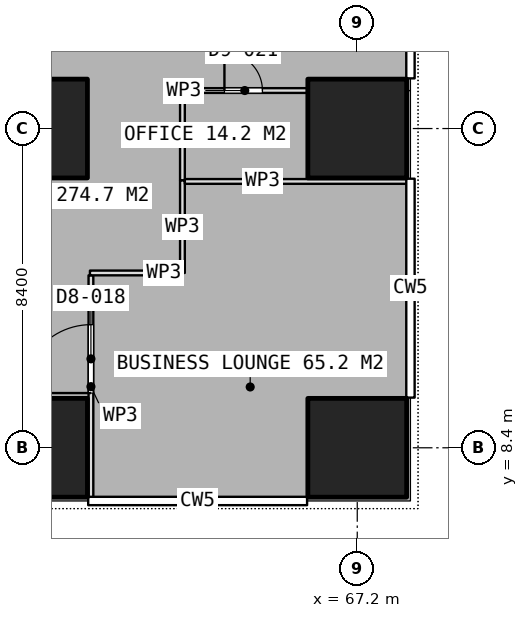
"""IFC4 building model, lengths in metres.
Left out: names, types, materials, properties, quantities, classifications, styles, units other than length and angle.
Written with IfcOpenShell. Run it as: python <this file> out.ifc"""

import sys

from ifc_helpers import new_model, si_unit, direction, frame, frame_2d, origin, origin_2d, place, context, subcontext, project, spatial, rectangle, extrude, element, fill, save


model = new_model("IFC4")
c1 = context("Model", 3, precision=1e-05, world=origin(), true_north=direction((0.0, 1.0)))
c2 = subcontext(c1, "Body", "Model", "MODEL_VIEW")
j1 = project(units=[si_unit("LENGTHUNIT", "METRE"), si_unit("PLANEANGLEUNIT", "RADIAN")], contexts=[c1])
p1 = place(None, origin())
s1 = spatial("IfcSite", under=j1, at=p1, CompositionType="ELEMENT")
p2 = place(p1, origin())
s2 = spatial("IfcBuilding", under=s1, at=p2, CompositionType="ELEMENT")
p3 = place(p2, frame((0.0, 0.0, 25.4)))
s3 = spatial("IfcBuildingStorey", under=s2, at=p3, CompositionType="ELEMENT", Elevation=25.4)
for number, where, z_axis, x_axis in (
    (1, (58.8, 8.4, 0.0), (0.0, 0.0, 1.0), (1.0, 0.0, 0.0)),
    (2, (58.8, 16.8, 0.0), (0.0, 0.0, 1.0), (1.0, 0.0, 0.0)),
    (3, (67.2, 8.4, 0.0), (0.0, 0.0, 1.0), (1.0, 0.0, 0.0)),
    (4, (67.2, 16.8, 0.0), (0.0, 0.0, 1.0), (1.0, 0.0, 0.0)),
):
    element("IfcColumn", number, at=place(p3, frame(where, z_axis=z_axis, x_axis=x_axis)), inside=s3, PredefinedType="COLUMN", context=c2, shape_type="SweptSolid", body=[
        extrude(rectangle(XDim=2.6, YDim=2.6, at=origin_2d()), origin(), (0.0, 0.0, 1.0), 3.75),
    ])
p4 = place(p3, frame((60.192, 7.08, 0.0), z_axis=(0.0, 0.0, 1.0), x_axis=(0.0, 1.0, 0.0)))
e5 = element("IfcWall", 5, at=p4, inside=s3, PredefinedType="PARTITIONING", context=c2, shape_type="SweptSolid", body=[
    extrude(rectangle(XDim=5.858, YDim=0.125, at=frame_2d((2.929, 0.0))), origin(), (0.0, 0.0, 1.0), 3.5),
])
p5 = place(p4, frame((2.76, 0.0, 0.0)))
e6 = element("IfcOpeningElement", 6, at=p5, cuts=e5, PredefinedType="OPENING", context=c2, shape_type="SweptSolid", body=[
    extrude(rectangle(XDim=1.8, YDim=2.1, at=frame_2d((0.9, 1.05))), frame((0.0, 0.073, 0.0), z_axis=(0.0, -1.0, 0.0), x_axis=(1.0, 0.0, 0.0)), (0.0, 0.0, 1.0), 0.145),
])
p6 = place(p3, frame((60.166, 13.0, 0.0), z_axis=(0.0, 0.0, 1.0), x_axis=(1.0, 0.0, 0.0)))
e7 = element("IfcWall", 7, at=p6, inside=s3, PredefinedType="PARTITIONING", context=c2, shape_type="SweptSolid", body=[
    extrude(rectangle(XDim=2.434, YDim=0.125, at=frame_2d((1.217, 0.0))), origin(), (0.0, 0.0, 1.0), 3.5),
])
p7 = place(p3, frame((62.6, 13.0, 0.0), z_axis=(0.0, 0.0, 1.0), x_axis=(0.0, 1.0, 0.0)))
e8 = element("IfcWall", 8, at=p7, inside=s3, PredefinedType="PARTITIONING", context=c2, shape_type="SweptSolid", body=[
    extrude(rectangle(XDim=2.435, YDim=0.125, at=frame_2d((1.218, 0.0))), origin(), (0.0, 0.0, 1.0), 3.5),
])
p8 = place(p3, frame((62.663, 15.408, 0.0), z_axis=(0.0, 0.0, 1.0), x_axis=(1.0, 0.0, 0.0)))
e9 = element("IfcWall", 9, at=p8, inside=s3, PredefinedType="PARTITIONING", context=c2, shape_type="SweptSolid", body=[
    extrude(rectangle(XDim=5.857, YDim=0.125, at=frame_2d((2.928, 0.0))), origin(), (0.0, 0.0, 1.0), 3.5),
])
p9 = place(p3, frame((62.6, 15.436, 0.0), z_axis=(0.0, 0.0, 1.0), x_axis=(0.0, 1.0, 0.0)))
e10 = element("IfcWall", 10, at=p9, inside=s3, PredefinedType="PARTITIONING", context=c2, shape_type="SweptSolid", body=[
    extrude(rectangle(XDim=2.364, YDim=0.125, at=frame_2d((1.182, 0.0))), origin(), (0.0, 0.0, 1.0), 3.5),
])
p10 = place(p3, frame((62.6, 17.8, 0.0), z_axis=(0.0, 0.0, 1.0), x_axis=(1.0, 0.0, 0.0)))
e11 = element("IfcWall", 11, at=p10, inside=s3, PredefinedType="PARTITIONING", context=c2, shape_type="SweptSolid", body=[
    extrude(rectangle(XDim=3.28, YDim=0.125, at=frame_2d((1.64, 0.0))), origin(), (0.0, 0.0, 1.0), 3.5),
])
p11 = place(p10, frame((1.105, 0.0, 0.0)))
e12 = element("IfcOpeningElement", 12, at=p11, cuts=e11, PredefinedType="OPENING", context=c2, shape_type="SweptSolid", body=[
    extrude(rectangle(XDim=1.0, YDim=2.1, at=frame_2d((0.5, 1.05))), frame((0.0, 0.073, 0.0), z_axis=(0.0, -1.0, 0.0), x_axis=(1.0, 0.0, 0.0)), (0.0, 0.0, 1.0), 0.145),
])
p12 = place(p5, origin())
e13 = element("IfcDoor", 13, at=p12, inside=s3, OperationType="DOUBLE_DOOR_SINGLE_SWING", PredefinedType="DOOR", context=c2, shape_type="SweptSolid", body=[
    extrude(rectangle(XDim=1.8, YDim=2.1, at=frame_2d((0.9, 1.05))), frame((0.0, 0.025, 0.0), z_axis=(0.0, -1.0, 0.0), x_axis=(1.0, 0.0, 0.0)), (0.0, 0.0, 1.0), 0.05),
])
fill(e6, e13)
p13 = place(p11, origin())
e14 = element("IfcDoor", 14, at=p13, inside=s3, OperationType="SINGLE_SWING_LEFT", PredefinedType="DOOR", context=c2, shape_type="SweptSolid", body=[
    extrude(rectangle(XDim=1.0, YDim=2.1, at=frame_2d((0.5, 1.05))), frame((0.0, 0.025, 0.0), z_axis=(0.0, -1.0, 0.0), x_axis=(1.0, 0.0, 0.0)), (0.0, 0.0, 1.0), 0.05),
])
fill(e12, e14)
save(model, sys.argv[1])
